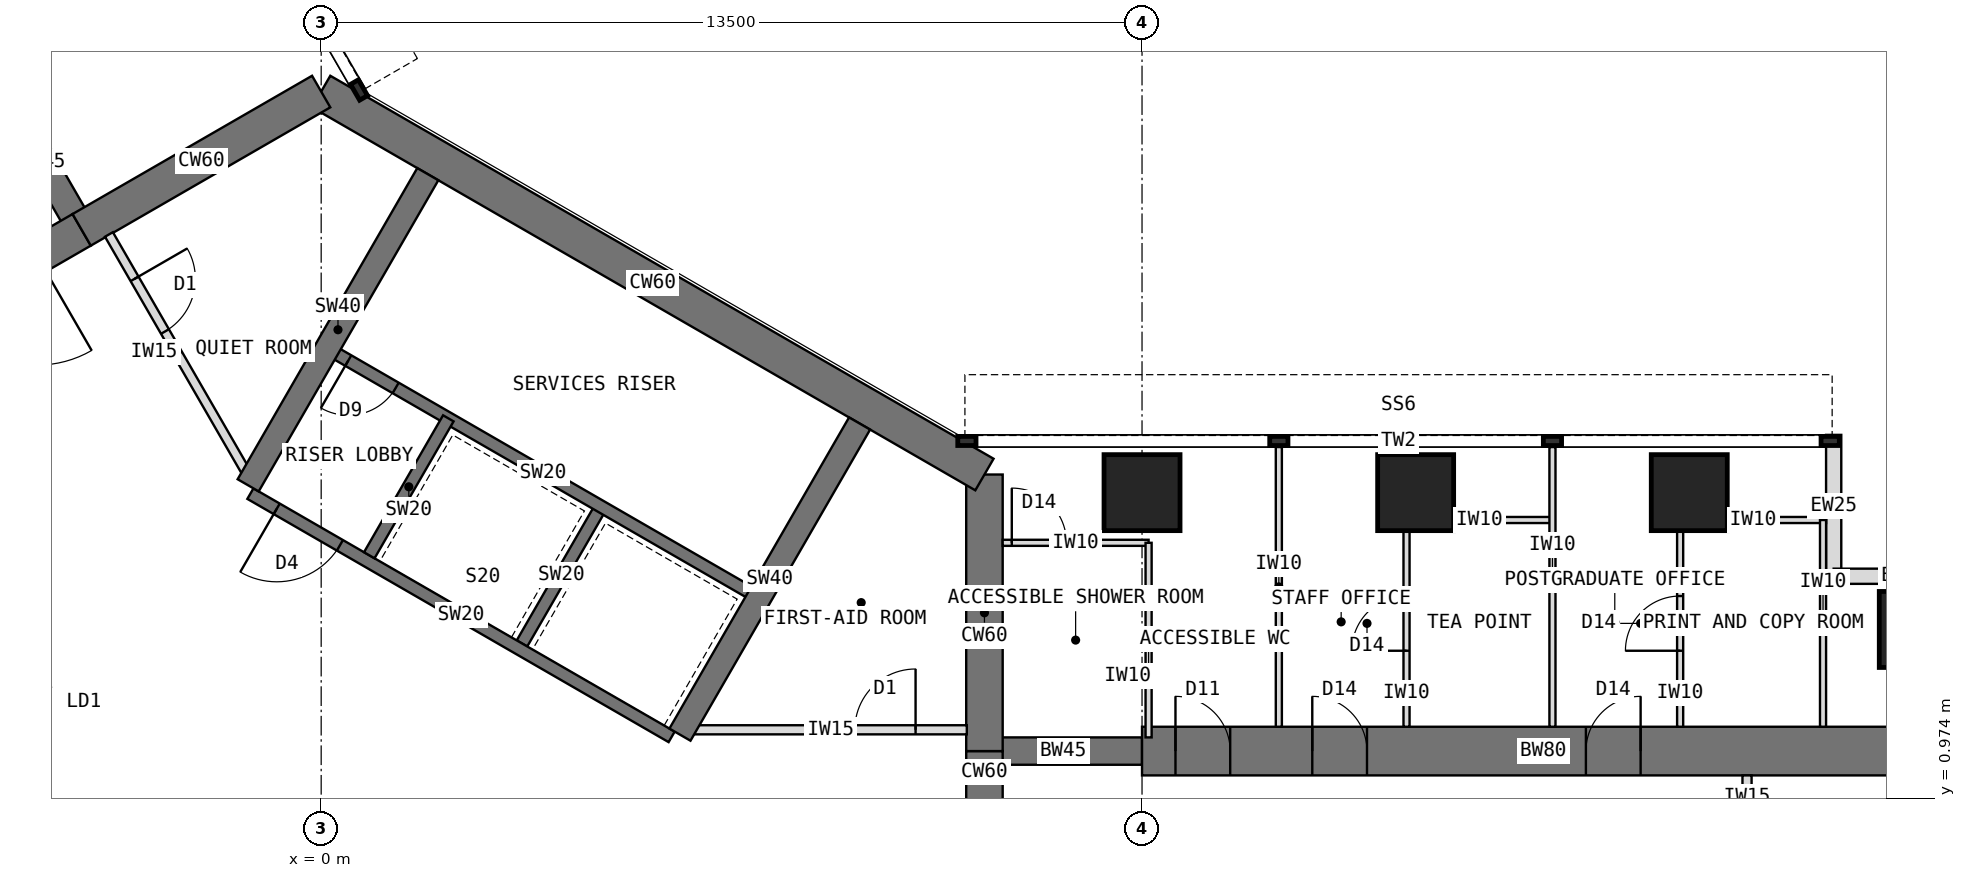
"""IFC4 building model, lengths in metres.
Left out: names, types, materials, properties, quantities, classifications, styles, units other than length and angle.
Written with IfcOpenShell. Run it as: python <this file> out.ifc"""

import sys

from ifc_helpers import new_model, si_unit, direction, frame, frame_2d, origin, origin_2d, place, context, subcontext, project, spatial, rectangle, extrude, element, fill, save


model = new_model("IFC4")
c1 = context("Model", 3, precision=1e-05, world=origin(), true_north=direction((0.0, 1.0)))
c2 = subcontext(c1, "Body", "Model", "MODEL_VIEW")
j1 = project(units=[si_unit("LENGTHUNIT", "METRE"), si_unit("PLANEANGLEUNIT", "RADIAN")], contexts=[c1])
p1 = place(None, origin())
s1 = spatial("IfcSite", under=j1, at=p1, CompositionType="ELEMENT")
p2 = place(p1, origin())
s2 = spatial("IfcBuilding", under=s1, at=p2, CompositionType="ELEMENT")
p3 = place(p2, frame((0.0, 0.0, 161.5)))
s3 = spatial("IfcBuildingStorey", under=s2, at=p3, CompositionType="ELEMENT", Elevation=161.5)
p4 = place(p3, frame((10.908, -1.75, 0.0), z_axis=(0.0, 0.0, 1.0), x_axis=(0.0, 1.0, 0.0)))
e1 = element("IfcWall", 1, at=p4, inside=s3, PredefinedType="SHEAR", context=c2, shape_type="SweptSolid", body=[
    extrude(rectangle(XDim=3.5, YDim=0.6, at=frame_2d((1.75, 0.0))), origin(), (0.0, 0.0, 1.0), 4.0),
])
p5 = place(p4, frame((0.85, 0.0, 0.0)))
e2 = element("IfcOpeningElement", 2, at=p5, cuts=e1, PredefinedType="OPENING", context=c2, shape_type="SweptSolid", body=[
    extrude(rectangle(XDim=1.8, YDim=2.1, at=frame_2d((0.9, 1.05))), frame((0.0, 0.31, 0.0), z_axis=(0.0, -1.0, 0.0), x_axis=(1.0, 0.0, 0.0)), (0.0, 0.0, 1.0), 0.62),
])
p6 = place(p3, frame((10.908, 1.75, 0.0), z_axis=(0.0, 0.0, 1.0), x_axis=(0.0, 1.0, 0.0)))
e3 = element("IfcWall", 3, at=p6, inside=s3, PredefinedType="SHEAR", context=c2, shape_type="SweptSolid", body=[
    extrude(rectangle(XDim=4.548, YDim=0.6, at=frame_2d((2.274, 0.0))), origin(), (0.0, 0.0, 1.0), 4.0),
])
p7 = place(p3, frame((10.908, 6.298, 0.0), z_axis=(0.0, 0.0, 1.0), x_axis=(-0.866021940709, 0.500005998175, 0.0)))
e4 = element("IfcWall", 4, at=p7, inside=s3, PredefinedType="SHEAR", context=c2, shape_type="SweptSolid", body=[
    extrude(rectangle(XDim=12.596, YDim=0.6, at=frame_2d((6.298, 0.0))), origin(), (0.0, 0.0, 1.0), 4.0),
])
p8 = place(p3, frame((0.0, 12.596, 0.0), z_axis=(0.0, 0.0, 1.0), x_axis=(-0.866011268655, -0.500024481964, 0.0)))
e5 = element("IfcWall", 5, at=p8, inside=s3, PredefinedType="SHEAR", context=c2, shape_type="SweptSolid", body=[
    extrude(rectangle(XDim=4.548, YDim=0.6, at=frame_2d((2.274, 0.0))), origin(), (0.0, 0.0, 1.0), 4.0),
])
p9 = place(p3, frame((-3.939, 10.322, 0.0), z_axis=(0.0, 0.0, 1.0), x_axis=(-0.866019471182, -0.500010275428, 0.0)))
e6 = element("IfcWall", 6, at=p9, inside=s3, PredefinedType="SHEAR", context=c2, shape_type="SweptSolid", body=[
    extrude(rectangle(XDim=3.5, YDim=0.6, at=frame_2d((1.75, 0.0))), origin(), (0.0, 0.0, 1.0), 4.0),
])
p10 = place(p9, frame((0.85, 0.0, 0.0)))
e7 = element("IfcOpeningElement", 7, at=p10, cuts=e6, PredefinedType="OPENING", context=c2, shape_type="SweptSolid", body=[
    extrude(rectangle(XDim=1.8, YDim=2.1, at=frame_2d((0.9, 1.05))), frame((0.0, 0.31, 0.0), z_axis=(0.0, -1.0, 0.0), x_axis=(1.0, 0.0, 0.0)), (0.0, 0.0, 1.0), 0.62),
])
p11 = place(p3, frame((10.908, 1.75, 0.0), z_axis=(0.0, 0.0, 1.0), x_axis=(1.0, 0.0, 0.0)))
e8 = element("IfcWall", 8, at=p11, inside=s3, PredefinedType="SHEAR", context=c2, shape_type="SweptSolid", body=[
    extrude(rectangle(XDim=2.592, YDim=0.45, at=frame_2d((1.296, 0.0))), origin(), (0.0, 0.0, 1.0), 4.0),
])
p12 = place(p3, frame((13.5, 1.75, 0.0), z_axis=(0.0, 0.0, 1.0), x_axis=(1.0, 0.0, 0.0)))
e9 = element("IfcWall", 9, at=p12, inside=s3, PredefinedType="SHEAR", context=c2, shape_type="SweptSolid", body=[
    extrude(rectangle(XDim=13.2, YDim=0.8, at=frame_2d((6.6, 0.0))), origin(), (0.0, 0.0, 1.0), 4.0),
])
p13 = place(p12, frame((0.55, 0.0, 0.0)))
e10 = element("IfcOpeningElement", 10, at=p13, cuts=e9, PredefinedType="OPENING", context=c2, shape_type="SweptSolid", body=[
    extrude(rectangle(XDim=0.9, YDim=2.1, at=frame_2d((0.45, 1.05))), frame((0.0, 0.41, 0.0), z_axis=(0.0, -1.0, 0.0), x_axis=(1.0, 0.0, 0.0)), (0.0, 0.0, 1.0), 0.82),
])
p14 = place(p12, frame((2.8, 0.0, 0.0)))
e11 = element("IfcOpeningElement", 11, at=p14, cuts=e9, PredefinedType="OPENING", context=c2, shape_type="SweptSolid", body=[
    extrude(rectangle(XDim=0.9, YDim=2.1, at=frame_2d((0.45, 1.05))), frame((0.0, 0.41, 0.0), z_axis=(0.0, -1.0, 0.0), x_axis=(1.0, 0.0, 0.0)), (0.0, 0.0, 1.0), 0.82),
])
p15 = place(p12, frame((7.3, 0.0, 0.0)))
e12 = element("IfcOpeningElement", 12, at=p15, cuts=e9, PredefinedType="OPENING", context=c2, shape_type="SweptSolid", body=[
    extrude(rectangle(XDim=0.9, YDim=2.1, at=frame_2d((0.45, 1.05))), frame((0.0, 0.41, 0.0), z_axis=(0.0, -1.0, 0.0), x_axis=(1.0, 0.0, 0.0)), (0.0, 0.0, 1.0), 0.82),
])
p16 = place(p3, frame((-3.939, 10.322, 0.0), z_axis=(0.0, 0.0, 1.0), x_axis=(-0.499918158782, 0.866072649678, 0.0)))
e13 = element("IfcWall", 13, at=p16, inside=s3, PredefinedType="SHEAR", context=c2, shape_type="SweptSolid", body=[
    extrude(rectangle(XDim=2.592, YDim=0.45, at=frame_2d((1.296, 0.0))), origin(), (0.0, 0.0, 1.0), 4.0),
])
for number, where, z_axis, x_axis in (
    (14, (13.5, 6.0, 0.0), (0.0, 0.0, 1.0), (1.0, 0.0, 0.0)),
    (15, (18.0, 6.0, 0.0), (0.0, 0.0, 1.0), (1.0, 0.0, 0.0)),
    (16, (22.5, 6.0, 0.0), (0.0, 0.0, 1.0), (1.0, 0.0, 0.0)),
    (17, (26.25, 3.75, 0.0), (0.0, 0.0, 1.0), (1.0, 0.0, 0.0)),
):
    element("IfcColumn", number, at=place(p3, frame(where, z_axis=z_axis, x_axis=x_axis)), inside=s3, PredefinedType="COLUMN", context=c2, shape_type="SweptSolid", body=[
        extrude(rectangle(XDim=1.25, YDim=1.25, at=origin_2d()), origin(), (0.0, 0.0, 1.0), 4.0),
    ])
for number, where, z_axis, x_axis in (
    (18, (24.875, 6.95, 0.0), (0.0, 0.0, 1.0), (0.0, -1.0, 0.0)),
    (19, (24.875, 4.625, 0.0), (0.0, 0.0, 1.0), (1.0, 0.0, 0.0)),
):
    element("IfcWall", number, at=place(p3, frame(where, z_axis=z_axis, x_axis=x_axis)), inside=s3, PredefinedType="STANDARD", context=c2, shape_type="SweptSolid", body=[
        extrude(rectangle(XDim=2.325, YDim=0.25, at=frame_2d((1.163, 0.0))), origin(), (0.0, 0.0, 1.0), 3.7),
    ])
p17 = place(p3, frame((5.764, 1.984, 0.0), z_axis=(0.0, 0.0, 1.0), x_axis=(-0.866026010844, 0.49999894854, 0.0)))
e20 = element("IfcWall", 20, at=p17, inside=s3, PredefinedType="SHEAR", context=c2, shape_type="SweptSolid", body=[
    extrude(rectangle(XDim=8.0, YDim=0.2, at=frame_2d((4.0, 0.0))), origin(), (0.0, 0.0, 1.0), 4.0),
])
p18 = place(p17, frame((6.3, 0.0, 0.0)))
e21 = element("IfcOpeningElement", 21, at=p18, cuts=e20, PredefinedType="OPENING", context=c2, shape_type="SweptSolid", body=[
    extrude(rectangle(XDim=1.2, YDim=2.1, at=frame_2d((0.6, 1.05))), frame((0.0, 0.11, 0.0), z_axis=(0.0, -1.0, 0.0), x_axis=(1.0, 0.0, 0.0)), (0.0, 0.0, 1.0), 0.22),
])
for number, where, z_axis, x_axis in (
    (22, (3.303, 3.52, 0.0), (0.0, 0.0, 1.0), (0.5, 0.866, 0.0)),
    (23, (0.791, 4.97, 0.0), (0.0, 0.0, 1.0), (0.5, 0.866, 0.0)),
):
    element("IfcWall", number, at=place(p3, frame(where, z_axis=z_axis, x_axis=x_axis)), inside=s3, PredefinedType="SHEAR", context=c2, shape_type="SweptSolid", body=[
        extrude(rectangle(XDim=2.6, YDim=0.2, at=frame_2d((1.3, 0.0))), origin(), (0.0, 0.0, 1.0), 4.0),
    ])
p19 = place(p3, frame((7.114, 4.322, 0.0), z_axis=(0.0, 0.0, 1.0), x_axis=(-0.866026010844, 0.49999894854, 0.0)))
e24 = element("IfcWall", 24, at=p19, inside=s3, PredefinedType="SHEAR", context=c2, shape_type="SweptSolid", body=[
    extrude(rectangle(XDim=8.0, YDim=0.2, at=frame_2d((4.0, 0.0))), origin(), (0.0, 0.0, 1.0), 4.0),
])
p20 = place(p19, frame((6.8, 0.0, 0.0)))
e25 = element("IfcOpeningElement", 25, at=p20, cuts=e24, PredefinedType="OPENING", context=c2, shape_type="SweptSolid", body=[
    extrude(rectangle(XDim=0.9, YDim=2.1, at=frame_2d((0.45, 1.05))), frame((0.0, 0.11, 0.0), z_axis=(0.0, -1.0, 0.0), x_axis=(1.0, 0.0, 0.0)), (0.0, 0.0, 1.0), 0.22),
])
p21 = place(p3, frame((-1.201, 6.12, 0.0), z_axis=(0.0, 0.0, 1.0), x_axis=(0.49999668571, 0.866027317282, 0.0)))
e26 = element("IfcWall", 26, at=p21, inside=s3, PredefinedType="SHEAR", context=c2, shape_type="SweptSolid", body=[
    extrude(rectangle(XDim=5.908, YDim=0.4, at=frame_2d((2.954, 0.0))), origin(), (0.0, 0.0, 1.0), 4.0),
])
p22 = place(p3, frame((5.901, 2.02, 0.0), z_axis=(0.0, 0.0, 1.0), x_axis=(0.500027676417, 0.866009424208, 0.0)))
e27 = element("IfcWall", 27, at=p22, inside=s3, PredefinedType="SHEAR", context=c2, shape_type="SweptSolid", body=[
    extrude(rectangle(XDim=5.908, YDim=0.4, at=frame_2d((2.954, 0.0))), origin(), (0.0, 0.0, 1.0), 4.0),
])
for number, where, z_axis, x_axis in (
    (28, (15.75, 2.15, 0.0), (0.0, 0.0, 1.0), (0.0, 1.0, 0.0)),
    (29, (20.25, 2.15, 0.0), (0.0, 0.0, 1.0), (0.0, 1.0, 0.0)),
):
    element("IfcWall", number, at=place(p3, frame(where, z_axis=z_axis, x_axis=x_axis)), inside=s3, PredefinedType="PARTITIONING", context=c2, shape_type="SweptSolid", body=[
        extrude(rectangle(XDim=4.6, YDim=0.1, at=frame_2d((2.3, 0.0))), origin(), (0.0, 0.0, 1.0), 3.7),
    ])
p23 = place(p3, frame((17.85, 5.55, 0.0), z_axis=(0.0, 0.0, 1.0), x_axis=(1.0, 0.0, 0.0)))
e30 = element("IfcWall", 30, at=p23, inside=s3, PredefinedType="PARTITIONING", context=c2, shape_type="SweptSolid", body=[
    extrude(rectangle(XDim=2.4, YDim=0.1, at=frame_2d((1.2, 0.0))), origin(), (0.0, 0.0, 1.0), 3.7),
])
p24 = place(p3, frame((17.85, 2.15, 0.0), z_axis=(0.0, 0.0, 1.0), x_axis=(0.0, 1.0, 0.0)))
e31 = element("IfcWall", 31, at=p24, inside=s3, PredefinedType="PARTITIONING", context=c2, shape_type="SweptSolid", body=[
    extrude(rectangle(XDim=3.4, YDim=0.1, at=frame_2d((1.7, 0.0))), origin(), (0.0, 0.0, 1.0), 3.7),
])
p25 = place(p24, frame((1.25, 0.0, 0.0)))
e32 = element("IfcOpeningElement", 32, at=p25, cuts=e31, PredefinedType="OPENING", context=c2, shape_type="SweptSolid", body=[
    extrude(rectangle(XDim=0.9, YDim=2.1, at=frame_2d((0.45, 1.05))), frame((0.0, 0.06, 0.0), z_axis=(0.0, -1.0, 0.0), x_axis=(1.0, 0.0, 0.0)), (0.0, 0.0, 1.0), 0.12),
])
p26 = place(p3, frame((22.35, 5.55, 0.0), z_axis=(0.0, 0.0, 1.0), x_axis=(1.0, 0.0, 0.0)))
e33 = element("IfcWall", 33, at=p26, inside=s3, PredefinedType="PARTITIONING", context=c2, shape_type="SweptSolid", body=[
    extrude(rectangle(XDim=2.4, YDim=0.1, at=frame_2d((1.2, 0.0))), origin(), (0.0, 0.0, 1.0), 3.7),
])
p27 = place(p3, frame((22.35, 2.15, 0.0), z_axis=(0.0, 0.0, 1.0), x_axis=(0.0, 1.0, 0.0)))
e34 = element("IfcWall", 34, at=p27, inside=s3, PredefinedType="PARTITIONING", context=c2, shape_type="SweptSolid", body=[
    extrude(rectangle(XDim=3.4, YDim=0.1, at=frame_2d((1.7, 0.0))), origin(), (0.0, 0.0, 1.0), 3.7),
])
p28 = place(p27, frame((1.25, 0.0, 0.0)))
e35 = element("IfcOpeningElement", 35, at=p28, cuts=e34, PredefinedType="OPENING", context=c2, shape_type="SweptSolid", body=[
    extrude(rectangle(XDim=0.9, YDim=2.1, at=frame_2d((0.45, 1.05))), frame((0.0, 0.06, 0.0), z_axis=(0.0, -1.0, 0.0), x_axis=(1.0, 0.0, 0.0)), (0.0, 0.0, 1.0), 0.12),
])
p29 = place(p3, frame((24.7, 2.15, 0.0), z_axis=(0.0, 0.0, 1.0), x_axis=(0.0, 1.0, 0.0)))
e36 = element("IfcWall", 36, at=p29, inside=s3, PredefinedType="PARTITIONING", context=c2, shape_type="SweptSolid", body=[
    extrude(rectangle(XDim=3.4, YDim=0.1, at=frame_2d((1.7, 0.0))), origin(), (0.0, 0.0, 1.0), 3.7),
])
p30 = place(p3, frame((11.208, 5.175, 0.0), z_axis=(0.0, 0.0, 1.0), x_axis=(1.0, 0.0, 0.0)))
e37 = element("IfcWall", 37, at=p30, inside=s3, PredefinedType="PARTITIONING", context=c2, shape_type="SweptSolid", body=[
    extrude(rectangle(XDim=2.4, YDim=0.1, at=frame_2d((1.2, 0.0))), origin(), (0.0, 0.0, 1.0), 3.7),
])
p31 = place(p30, frame((0.15, 0.0, 0.0)))
e38 = element("IfcOpeningElement", 38, at=p31, cuts=e37, PredefinedType="OPENING", context=c2, shape_type="SweptSolid", body=[
    extrude(rectangle(XDim=0.9, YDim=2.1, at=frame_2d((0.45, 1.05))), frame((0.0, 0.06, 0.0), z_axis=(0.0, -1.0, 0.0), x_axis=(1.0, 0.0, 0.0)), (0.0, 0.0, 1.0), 0.12),
])
p32 = place(p3, frame((13.608, 1.975, 0.0), z_axis=(0.0, 0.0, 1.0), x_axis=(0.0, 1.0, 0.0)))
e39 = element("IfcWall", 39, at=p32, inside=s3, PredefinedType="PARTITIONING", context=c2, shape_type="SweptSolid", body=[
    extrude(rectangle(XDim=3.2, YDim=0.1, at=frame_2d((1.6, 0.0))), origin(), (0.0, 0.0, 1.0), 3.7),
])
p33 = place(p3, frame((-3.49, 10.246, 0.0), z_axis=(0.0, 0.0, 1.0), x_axis=(0.499999473313, -0.866025707867, 0.0)))
e40 = element("IfcWall", 40, at=p33, inside=s3, PredefinedType="PARTITIONING", context=c2, shape_type="SweptSolid", body=[
    extrude(rectangle(XDim=4.476, YDim=0.15, at=frame_2d((2.238, 0.0))), origin(), (0.0, 0.0, 1.0), 3.7),
])
p34 = place(p33, frame((0.843, 0.0, 0.0)))
e41 = element("IfcOpeningElement", 41, at=p34, cuts=e40, PredefinedType="OPENING", context=c2, shape_type="SweptSolid", body=[
    extrude(rectangle(XDim=1.0, YDim=2.1, at=frame_2d((0.5, 1.05))), frame((0.0, 0.085, 0.0), z_axis=(0.0, -1.0, 0.0), x_axis=(1.0, 0.0, 0.0)), (0.0, 0.0, 1.0), 0.17),
])
p35 = place(p3, frame((6.143, 2.1, 0.0), z_axis=(0.0, 0.0, 1.0), x_axis=(1.0, 0.0, 0.0)))
e42 = element("IfcWall", 42, at=p35, inside=s3, PredefinedType="PARTITIONING", context=c2, shape_type="SweptSolid", body=[
    extrude(rectangle(XDim=4.476, YDim=0.15, at=frame_2d((2.238, 0.0))), origin(), (0.0, 0.0, 1.0), 3.7),
])
p36 = place(p35, frame((2.633, 0.0, 0.0)))
e43 = element("IfcOpeningElement", 43, at=p36, cuts=e42, PredefinedType="OPENING", context=c2, shape_type="SweptSolid", body=[
    extrude(rectangle(XDim=1.0, YDim=2.1, at=frame_2d((0.5, 1.05))), frame((0.0, 0.085, 0.0), z_axis=(0.0, -1.0, 0.0), x_axis=(1.0, 0.0, 0.0)), (0.0, 0.0, 1.0), 0.17),
])
p37 = place(p3, frame((23.45, -1.35, 0.0), z_axis=(0.0, 0.0, 1.0), x_axis=(0.0, 1.0, 0.0)))
e44 = element("IfcWall", 44, at=p37, inside=s3, PredefinedType="PARTITIONING", context=c2, shape_type="SweptSolid", body=[
    extrude(rectangle(XDim=2.7, YDim=0.15, at=frame_2d((1.35, 0.0))), origin(), (0.0, 0.0, 1.0), 3.7),
])
p38 = place(p37, frame((0.85, 0.0, 0.0)))
e45 = element("IfcOpeningElement", 45, at=p38, cuts=e44, PredefinedType="OPENING", context=c2, shape_type="SweptSolid", body=[
    extrude(rectangle(XDim=1.0, YDim=2.1, at=frame_2d((0.5, 1.05))), frame((0.0, 0.085, 0.0), z_axis=(0.0, -1.0, 0.0), x_axis=(1.0, 0.0, 0.0)), (0.0, 0.0, 1.0), 0.17),
])
p39 = place(p18, origin())
e46 = element("IfcDoor", 46, at=p39, inside=s3, OperationType="SINGLE_SWING_RIGHT", PredefinedType="DOOR", context=c2, shape_type="SweptSolid", body=[
    extrude(rectangle(XDim=1.2, YDim=2.1, at=frame_2d((0.6, 1.05))), frame((0.0, 0.025, 0.0), z_axis=(0.0, -1.0, 0.0), x_axis=(1.0, 0.0, 0.0)), (0.0, 0.0, 1.0), 0.05),
])
fill(e21, e46)
p40 = place(p20, origin())
e47 = element("IfcDoor", 47, at=p40, inside=s3, OperationType="SINGLE_SWING_RIGHT", PredefinedType="DOOR", context=c2, shape_type="SweptSolid", body=[
    extrude(rectangle(XDim=0.9, YDim=2.1, at=frame_2d((0.45, 1.05))), frame((0.0, 0.025, 0.0), z_axis=(0.0, -1.0, 0.0), x_axis=(1.0, 0.0, 0.0)), (0.0, 0.0, 1.0), 0.05),
])
fill(e25, e47)
p41 = place(p25, origin())
e48 = element("IfcDoor", 48, at=p41, inside=s3, OperationType="SINGLE_SWING_LEFT", PredefinedType="DOOR", context=c2, shape_type="SweptSolid", body=[
    extrude(rectangle(XDim=0.9, YDim=2.1, at=frame_2d((0.45, 1.05))), frame((0.0, 0.025, 0.0), z_axis=(0.0, -1.0, 0.0), x_axis=(1.0, 0.0, 0.0)), (0.0, 0.0, 1.0), 0.05),
])
fill(e32, e48)
p42 = place(p28, origin())
e49 = element("IfcDoor", 49, at=p42, inside=s3, OperationType="SINGLE_SWING_LEFT", PredefinedType="DOOR", context=c2, shape_type="SweptSolid", body=[
    extrude(rectangle(XDim=0.9, YDim=2.1, at=frame_2d((0.45, 1.05))), frame((0.0, 0.025, 0.0), z_axis=(0.0, -1.0, 0.0), x_axis=(1.0, 0.0, 0.0)), (0.0, 0.0, 1.0), 0.05),
])
fill(e35, e49)
p43 = place(p31, origin())
e50 = element("IfcDoor", 50, at=p43, inside=s3, OperationType="SINGLE_SWING_LEFT", PredefinedType="DOOR", context=c2, shape_type="SweptSolid", body=[
    extrude(rectangle(XDim=0.9, YDim=2.1, at=frame_2d((0.45, 1.05))), frame((0.0, 0.025, 0.0), z_axis=(0.0, -1.0, 0.0), x_axis=(1.0, 0.0, 0.0)), (0.0, 0.0, 1.0), 0.05),
])
fill(e38, e50)
p44 = place(p36, origin())
e51 = element("IfcDoor", 51, at=p44, inside=s3, OperationType="SINGLE_SWING_RIGHT", PredefinedType="DOOR", context=c2, shape_type="SweptSolid", body=[
    extrude(rectangle(XDim=1.0, YDim=2.1, at=frame_2d((0.5, 1.05))), frame((0.0, 0.025, 0.0), z_axis=(0.0, -1.0, 0.0), x_axis=(1.0, 0.0, 0.0)), (0.0, 0.0, 1.0), 0.05),
])
fill(e43, e51)
p45 = place(p34, origin())
e52 = element("IfcDoor", 52, at=p45, inside=s3, OperationType="SINGLE_SWING_LEFT", PredefinedType="DOOR", context=c2, shape_type="SweptSolid", body=[
    extrude(rectangle(XDim=1.0, YDim=2.1, at=frame_2d((0.5, 1.05))), frame((0.0, 0.025, 0.0), z_axis=(0.0, -1.0, 0.0), x_axis=(1.0, 0.0, 0.0)), (0.0, 0.0, 1.0), 0.05),
])
fill(e41, e52)
p46 = place(p13, origin())
e53 = element("IfcDoor", 53, at=p46, inside=s3, OperationType="SINGLE_SWING_LEFT", PredefinedType="DOOR", context=c2, shape_type="SweptSolid", body=[
    extrude(rectangle(XDim=0.82, YDim=2.06, at=frame_2d((0.45, 1.03))), frame((0.0, 0.025, 0.0), z_axis=(0.0, -1.0, 0.0), x_axis=(1.0, 0.0, 0.0)), (0.0, 0.0, 1.0), 0.05),
    extrude(rectangle(XDim=0.04, YDim=2.1, at=frame_2d((0.02, 1.05))), frame((0.0, 0.4, 0.0), z_axis=(0.0, -1.0, 0.0), x_axis=(1.0, 0.0, 0.0)), (0.0, 0.0, 1.0), 0.8),
    extrude(rectangle(XDim=0.04, YDim=2.1, at=frame_2d((0.88, 1.05))), frame((0.0, 0.4, 0.0), z_axis=(0.0, -1.0, 0.0), x_axis=(1.0, 0.0, 0.0)), (0.0, 0.0, 1.0), 0.8),
    extrude(rectangle(XDim=0.82, YDim=0.04, at=frame_2d((0.45, 2.08))), frame((0.0, 0.4, 0.0), z_axis=(0.0, -1.0, 0.0), x_axis=(1.0, 0.0, 0.0)), (0.0, 0.0, 1.0), 0.8),
])
fill(e10, e53)
p47 = place(p14, origin())
e54 = element("IfcDoor", 54, at=p47, inside=s3, OperationType="SINGLE_SWING_LEFT", PredefinedType="DOOR", context=c2, shape_type="SweptSolid", body=[
    extrude(rectangle(XDim=0.82, YDim=2.06, at=frame_2d((0.45, 1.03))), frame((0.0, 0.025, 0.0), z_axis=(0.0, -1.0, 0.0), x_axis=(1.0, 0.0, 0.0)), (0.0, 0.0, 1.0), 0.05),
    extrude(rectangle(XDim=0.04, YDim=2.1, at=frame_2d((0.02, 1.05))), frame((0.0, 0.4, 0.0), z_axis=(0.0, -1.0, 0.0), x_axis=(1.0, 0.0, 0.0)), (0.0, 0.0, 1.0), 0.8),
    extrude(rectangle(XDim=0.04, YDim=2.1, at=frame_2d((0.88, 1.05))), frame((0.0, 0.4, 0.0), z_axis=(0.0, -1.0, 0.0), x_axis=(1.0, 0.0, 0.0)), (0.0, 0.0, 1.0), 0.8),
    extrude(rectangle(XDim=0.82, YDim=0.04, at=frame_2d((0.45, 2.08))), frame((0.0, 0.4, 0.0), z_axis=(0.0, -1.0, 0.0), x_axis=(1.0, 0.0, 0.0)), (0.0, 0.0, 1.0), 0.8),
])
fill(e11, e54)
p48 = place(p15, origin())
e55 = element("IfcDoor", 55, at=p48, inside=s3, OperationType="SINGLE_SWING_RIGHT", PredefinedType="DOOR", context=c2, shape_type="SweptSolid", body=[
    extrude(rectangle(XDim=0.82, YDim=2.06, at=frame_2d((0.45, 1.03))), frame((0.0, 0.025, 0.0), z_axis=(0.0, -1.0, 0.0), x_axis=(1.0, 0.0, 0.0)), (0.0, 0.0, 1.0), 0.05),
    extrude(rectangle(XDim=0.04, YDim=2.1, at=frame_2d((0.02, 1.05))), frame((0.0, 0.4, 0.0), z_axis=(0.0, -1.0, 0.0), x_axis=(1.0, 0.0, 0.0)), (0.0, 0.0, 1.0), 0.8),
    extrude(rectangle(XDim=0.04, YDim=2.1, at=frame_2d((0.88, 1.05))), frame((0.0, 0.4, 0.0), z_axis=(0.0, -1.0, 0.0), x_axis=(1.0, 0.0, 0.0)), (0.0, 0.0, 1.0), 0.8),
    extrude(rectangle(XDim=0.82, YDim=0.04, at=frame_2d((0.45, 2.08))), frame((0.0, 0.4, 0.0), z_axis=(0.0, -1.0, 0.0), x_axis=(1.0, 0.0, 0.0)), (0.0, 0.0, 1.0), 0.8),
])
fill(e12, e55)
save(model, sys.argv[1])
